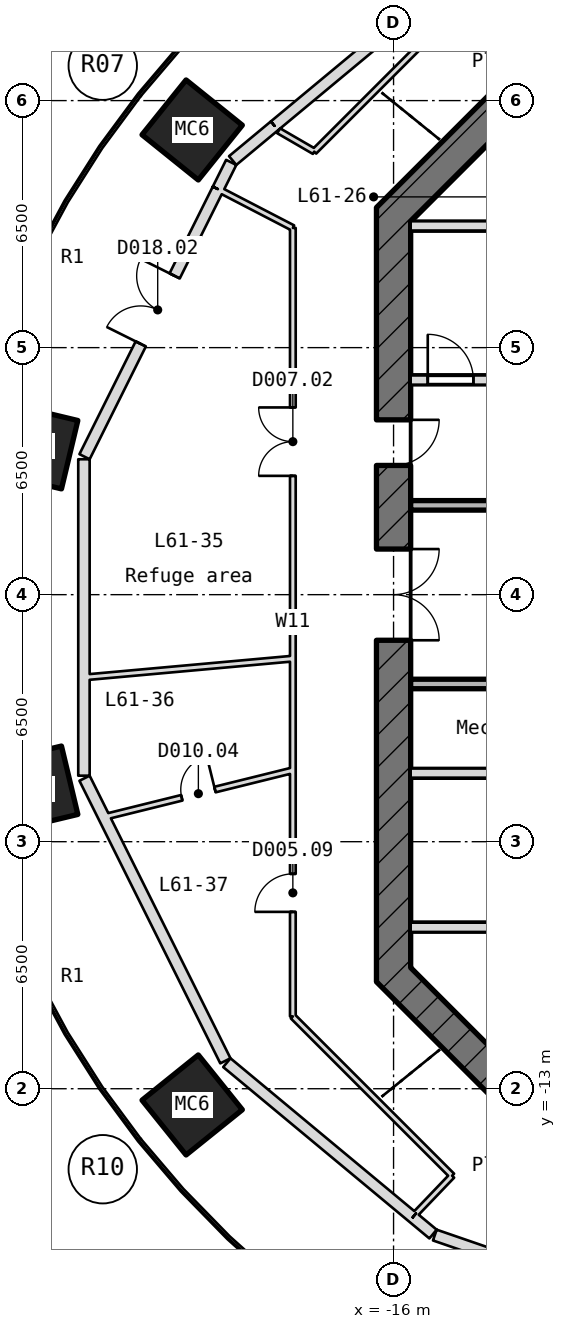
"""IFC4 building model, lengths in metres.
Left out: names, types, materials, properties, quantities, classifications, styles, units other than length and angle.
Written with IfcOpenShell. Run it as: python <this file> out.ifc"""

import sys

from ifc_helpers import new_model, si_unit, direction, frame, frame_2d, origin, place, context, subcontext, project, spatial, polyline, rectangle, outline, extrude, element, fill, save


model = new_model("IFC4")
c1 = context("Model", 3, precision=1e-05, world=origin(), true_north=direction((0.0, 1.0)))
c2 = subcontext(c1, "Body", "Model", "MODEL_VIEW")
j1 = project(units=[si_unit("LENGTHUNIT", "METRE"), si_unit("PLANEANGLEUNIT", "RADIAN")], contexts=[c1])
p1 = place(None, origin())
s1 = spatial("IfcSite", under=j1, at=p1, CompositionType="ELEMENT")
p2 = place(p1, origin())
s2 = spatial("IfcBuilding", under=s1, at=p2, CompositionType="ELEMENT")
p3 = place(p2, frame((0.0, 0.0, 273.1)))
s3 = spatial("IfcBuildingStorey", under=s2, at=p3, CompositionType="ELEMENT", Elevation=273.1)
p4 = place(p3, frame((0.0, 0.0, -0.3)))
e1 = element("IfcColumn", 1, at=p4, inside=s3, PredefinedType="COLUMN", context=c2, shape_type="SweptSolid", body=[
    extrude(outline(polyline([(-21.138, 10.911), (-22.97, 12.208), (-24.451, 13.399), (-23.292, 14.84), (-21.46, 13.543), (-19.979, 12.353), (-21.138, 10.911)])), origin(), (0.0, 0.0, 1.0), 6.05),
])
p5 = place(p3, frame((0.0, 0.0, -0.3)))
e2 = element("IfcColumn", 2, at=p5, inside=s3, PredefinedType="COLUMN", context=c2, shape_type="SweptSolid", body=[
    extrude(outline(polyline([(-24.739, 2.783), (-26.586, 3.226), (-28.352, 4.655), (-27.921, 6.454), (-26.073, 6.011), (-24.308, 4.583), (-24.739, 2.783)])), origin(), (0.0, 0.0, 1.0), 6.05),
])
p6 = place(p3, frame((0.0, 0.0, -0.3)))
e3 = element("IfcColumn", 3, at=p6, inside=s3, PredefinedType="COLUMN", context=c2, shape_type="SweptSolid", body=[
    extrude(outline(polyline([(-26.156, -6.225), (-27.921, -4.654), (-28.352, -2.854), (-26.504, -2.412), (-24.739, -3.983), (-24.308, -5.783), (-26.156, -6.225)])), origin(), (0.0, 0.0, 1.0), 6.05),
])
p7 = place(p3, frame((0.0, 0.0, -0.3)))
e4 = element("IfcColumn", 4, at=p7, inside=s3, PredefinedType="COLUMN", context=c2, shape_type="SweptSolid", body=[
    extrude(outline(polyline([(-21.46, -14.743), (-23.292, -13.04), (-24.451, -11.599), (-22.97, -10.408), (-21.138, -12.111), (-19.979, -13.552), (-21.46, -14.743)])), origin(), (0.0, 0.0, 1.0), 6.05),
])
p8 = place(p3, frame((0.0, 0.0, -0.3)))
e5 = element("IfcColumn", 5, at=p8, inside=s3, PredefinedType="COLUMN", context=c2, shape_type="SweptSolid", body=[
    extrude(outline(polyline([(-13.287, -21.077), (-14.904, -20.178), (-16.858, -18.375), (-15.936, -16.714), (-14.318, -17.612), (-12.365, -19.416), (-13.287, -21.077)])), origin(), (0.0, 0.0, 1.0), 6.05),
])
p9 = place(p3, frame((-12.868, 13.132, -0.3), z_axis=(0.0, 0.0, 1.0), x_axis=(-0.707106781187, -0.707106781187, 0.0)))
e6 = element("IfcWall", 6, at=p9, inside=s3, PredefinedType="SHEAR", context=c2, shape_type="SweptSolid", body=[
    extrude(rectangle(XDim=4.615, YDim=0.9, at=frame_2d((2.308, 0.0))), origin(), (0.0, 0.0, 1.0), 6.05),
])
p10 = place(p3, frame((-16.0, 10.186, -0.3), z_axis=(0.0, 0.0, 1.0), x_axis=(0.0, -1.0, 0.0)))
e7 = element("IfcWall", 7, at=p10, inside=s3, PredefinedType="SHEAR", context=c2, shape_type="SweptSolid", body=[
    extrude(rectangle(XDim=20.373, YDim=0.9, at=frame_2d((10.186, 0.0))), origin(), (0.0, 0.0, 1.0), 6.05),
])
p11 = place(p10, frame((8.986, 0.0, 0.3)))
e8 = element("IfcOpeningElement", 8, at=p11, cuts=e7, PredefinedType="OPENING", context=c2, shape_type="SweptSolid", body=[
    extrude(rectangle(XDim=2.4, YDim=2.1, at=frame_2d((1.2, 1.05))), frame((0.0, 0.46, 0.0), z_axis=(0.0, -1.0, 0.0), x_axis=(1.0, 0.0, 0.0)), (0.0, 0.0, 1.0), 0.92),
])
p12 = place(p10, frame((5.586, 0.0, 0.3)))
e9 = element("IfcOpeningElement", 9, at=p12, cuts=e7, PredefinedType="OPENING", context=c2, shape_type="SweptSolid", body=[
    extrude(rectangle(XDim=1.2, YDim=2.1, at=frame_2d((0.6, 1.05))), frame((0.0, 0.46, 0.0), z_axis=(0.0, -1.0, 0.0), x_axis=(1.0, 0.0, 0.0)), (0.0, 0.0, 1.0), 0.92),
])
p13 = place(p3, frame((-16.132, -9.868, -0.3), z_axis=(0.0, 0.0, 1.0), x_axis=(0.707106781187, -0.707106781187, 0.0)))
e10 = element("IfcWall", 10, at=p13, inside=s3, PredefinedType="SHEAR", context=c2, shape_type="SweptSolid", body=[
    extrude(rectangle(XDim=4.615, YDim=0.9, at=frame_2d((2.308, 0.0))), origin(), (0.0, 0.0, 1.0), 6.05),
])
p14 = place(p3, frame((-15.55, -8.75, -0.3), z_axis=(0.0, 0.0, 1.0), x_axis=(1.0, 0.0, 0.0)))
e11 = element("IfcWall", 11, at=p14, inside=s3, PredefinedType="SHEAR", context=c2, shape_type="SweptSolid", body=[
    extrude(rectangle(XDim=7.0, YDim=0.25, at=frame_2d((3.5, 0.0))), origin(), (0.0, 0.0, 1.0), 6.05),
])
p15 = place(p14, frame((5.5, 0.0, 0.3)))
e12 = element("IfcOpeningElement", 12, at=p15, cuts=e11, PredefinedType="OPENING", context=c2, shape_type="SweptSolid", body=[
    extrude(rectangle(XDim=1.2, YDim=2.1, at=frame_2d((0.6, 1.05))), frame((0.0, 0.135, 0.0), z_axis=(0.0, -1.0, 0.0), x_axis=(1.0, 0.0, 0.0)), (0.0, 0.0, 1.0), 0.27),
])
p16 = place(p3, frame((-15.55, -4.7, -0.3), z_axis=(0.0, 0.0, 1.0), x_axis=(1.0, 0.0, 0.0)))
e13 = element("IfcWall", 13, at=p16, inside=s3, PredefinedType="SHEAR", context=c2, shape_type="SweptSolid", body=[
    extrude(rectangle(XDim=7.0, YDim=0.25, at=frame_2d((3.5, 0.0))), origin(), (0.0, 0.0, 1.0), 6.05),
])
for number, where, z_axis, x_axis in (
    (14, (-15.55, -2.35, 0.0), (0.0, 0.0, 1.0), (1.0, 0.0, 0.0)),
    (15, (-15.55, 2.35, 0.0), (0.0, 0.0, 1.0), (1.0, 0.0, 0.0)),
):
    element("IfcWall", number, at=place(p3, frame(where, z_axis=z_axis, x_axis=x_axis)), inside=s3, PredefinedType="STANDARD", context=c2, shape_type="SweptSolid", body=[
        extrude(rectangle(XDim=7.15, YDim=0.25, at=frame_2d((3.575, 0.0))), origin(), (0.0, 0.0, 1.0), 5.75),
    ])
p17 = place(p3, frame((-15.55, 5.65, -0.3), z_axis=(0.0, 0.0, 1.0), x_axis=(1.0, 0.0, 0.0)))
e16 = element("IfcWall", 16, at=p17, inside=s3, PredefinedType="SHEAR", context=c2, shape_type="SweptSolid", body=[
    extrude(rectangle(XDim=7.0, YDim=0.25, at=frame_2d((3.5, 0.0))), origin(), (0.0, 0.0, 1.0), 6.05),
])
p18 = place(p17, frame((0.45, 0.0, 0.3)))
e17 = element("IfcOpeningElement", 17, at=p18, cuts=e16, PredefinedType="OPENING", context=c2, shape_type="SweptSolid", body=[
    extrude(rectangle(XDim=1.2, YDim=2.1, at=frame_2d((0.6, 1.05))), frame((0.0, 0.135, 0.0), z_axis=(0.0, -1.0, 0.0), x_axis=(1.0, 0.0, 0.0)), (0.0, 0.0, 1.0), 0.27),
])
p19 = place(p3, frame((-15.55, 9.7, -0.3), z_axis=(0.0, 0.0, 1.0), x_axis=(1.0, 0.0, 0.0)))
e18 = element("IfcWall", 18, at=p19, inside=s3, PredefinedType="SHEAR", context=c2, shape_type="SweptSolid", body=[
    extrude(rectangle(XDim=7.0, YDim=0.25, at=frame_2d((3.5, 0.0))), origin(), (0.0, 0.0, 1.0), 6.05),
])
p20 = place(p3, frame((-19.133, 12.337, 0.0), z_axis=(0.0, 0.0, 1.0), x_axis=(0.769069827142, 0.639164768257, 0.0)))
e19 = element("IfcWall", 19, at=p20, inside=s3, PredefinedType="STANDARD", context=c2, shape_type="SweptSolid", body=[
    extrude(rectangle(XDim=7.965, YDim=0.3, at=frame_2d((3.982, 0.0))), origin(), (0.0, 0.0, 1.0), 5.75),
])
p21 = place(p3, frame((-24.131, 3.63, 0.0), z_axis=(0.0, 0.0, 1.0), x_axis=(0.446058739895, 0.895003687458, 0.0)))
e20 = element("IfcWall", 20, at=p21, inside=s3, PredefinedType="STANDARD", context=c2, shape_type="SweptSolid", body=[
    extrude(rectangle(XDim=7.867, YDim=0.3, at=frame_2d((3.933, 0.0))), origin(), (0.0, 0.0, 1.0), 5.75),
])
p22 = place(p21, frame((3.316, 0.0, 0.0)))
e21 = element("IfcOpeningElement", 21, at=p22, cuts=e20, PredefinedType="OPENING", context=c2, shape_type="SweptSolid", body=[
    extrude(rectangle(XDim=2.0, YDim=2.1, at=frame_2d((1.0, 1.05))), frame((0.0, 0.16, 0.0), z_axis=(0.0, -1.0, 0.0), x_axis=(1.0, 0.0, 0.0)), (0.0, 0.0, 1.0), 0.32),
])
p23 = place(p3, frame((-24.147, -4.763, 0.0), z_axis=(0.0, 0.0, 1.0), x_axis=(0.0, 1.0, 0.0)))
e22 = element("IfcWall", 22, at=p23, inside=s3, PredefinedType="STANDARD", context=c2, shape_type="SweptSolid", body=[
    extrude(rectangle(XDim=8.326, YDim=0.3, at=frame_2d((4.163, 0.0))), origin(), (0.0, 0.0, 1.0), 5.75),
])
p24 = place(p3, frame((-20.425, -12.266, 0.0), z_axis=(0.0, 0.0, 1.0), x_axis=(-0.44606134028, 0.895002391453, 0.0)))
e23 = element("IfcWall", 23, at=p24, inside=s3, PredefinedType="STANDARD", context=c2, shape_type="SweptSolid", body=[
    extrude(rectangle(XDim=8.308, YDim=0.3, at=frame_2d((4.154, 0.0))), origin(), (0.0, 0.0, 1.0), 5.75),
])
p25 = place(p3, frame((-15.493, -16.382, 0.0), z_axis=(0.0, 0.0, 1.0), x_axis=(-0.769038321176, 0.639202675653, 0.0)))
e24 = element("IfcWall", 24, at=p25, inside=s3, PredefinedType="STANDARD", context=c2, shape_type="SweptSolid", body=[
    extrude(rectangle(XDim=6.363, YDim=0.3, at=frame_2d((3.182, 0.0))), origin(), (0.0, 0.0, 1.0), 5.75),
])
p26 = place(p3, frame((-20.233, 11.422, 0.0), z_axis=(0.0, 0.0, 1.0), x_axis=(0.769115538699, 0.639109762193, 0.0)))
e25 = element("IfcWall", 25, at=p26, inside=s3, PredefinedType="STANDARD", context=c2, shape_type="SweptSolid", body=[
    extrude(rectangle(XDim=1.431, YDim=0.3, at=frame_2d((0.715, 0.0))), origin(), (0.0, 0.0, 1.0), 5.75),
])
p27 = place(p3, frame((-20.622, 10.671, 0.0), z_axis=(0.0, 0.0, 1.0), x_axis=(0.446218959337, 0.89492381817, 0.0)))
e26 = element("IfcWall", 26, at=p27, inside=s3, PredefinedType="STANDARD", context=c2, shape_type="SweptSolid", body=[
    extrude(rectangle(XDim=0.786, YDim=0.3, at=frame_2d((0.393, 0.0))), origin(), (0.0, 0.0, 1.0), 5.75),
])
p28 = place(p3, frame((-14.961, -16.824, 0.0), z_axis=(0.0, 0.0, 1.0), x_axis=(-0.769030292566, 0.639212334922, 0.0)))
e27 = element("IfcWall", 27, at=p28, inside=s3, PredefinedType="STANDARD", context=c2, shape_type="SweptSolid", body=[
    extrude(rectangle(XDim=0.692, YDim=0.3, at=frame_2d((0.346, 0.0))), origin(), (0.0, 0.0, 1.0), 5.75),
])
p29 = place(p3, frame((-11.326, -18.086, 0.0), z_axis=(0.0, 0.0, 1.0), x_axis=(-0.945523953298, 0.325552536067, 0.0)))
e28 = element("IfcWall", 28, at=p29, inside=s3, PredefinedType="STANDARD", context=c2, shape_type="SweptSolid", body=[
    extrude(rectangle(XDim=3.795, YDim=0.3, at=frame_2d((1.898, 0.0))), origin(), (0.0, 0.0, 1.0), 5.75),
])
p30 = place(p3, frame((-24.137, -2.177, 0.0), z_axis=(0.0, 0.0, 1.0), x_axis=(0.995957513346, 0.089825562115, 0.0)))
e29 = element("IfcWall", 29, at=p30, inside=s3, PredefinedType="PARTITIONING", context=c2, shape_type="SweptSolid", body=[
    extrude(rectangle(XDim=5.517, YDim=0.15, at=frame_2d((2.759, 0.0))), origin(), (0.0, 0.0, 1.0), 5.75),
])
p31 = place(p3, frame((-23.628, -5.854, 0.0), z_axis=(0.0, 0.0, 1.0), x_axis=(0.970654908587, 0.240476710797, 0.0)))
e30 = element("IfcWall", 30, at=p31, inside=s3, PredefinedType="PARTITIONING", context=c2, shape_type="SweptSolid", body=[
    extrude(rectangle(XDim=5.135, YDim=0.15, at=frame_2d((2.567, 0.0))), origin(), (0.0, 0.0, 1.0), 5.214),
])
p32 = place(p31, frame((2.118, 0.0, 0.0)))
e31 = element("IfcOpeningElement", 31, at=p32, cuts=e30, PredefinedType="OPENING", context=c2, shape_type="SweptSolid", body=[
    extrude(rectangle(XDim=0.9, YDim=2.1, at=frame_2d((0.45, 1.05))), frame((0.0, 0.085, 0.0), z_axis=(0.0, -1.0, 0.0), x_axis=(1.0, 0.0, 0.0)), (0.0, 0.0, 1.0), 0.17),
])
p33 = place(p3, frame((-18.089, 11.658, 0.0), z_axis=(0.0, 0.0, 1.0), x_axis=(0.707106781187, 0.707106781187, 0.0)))
e32 = element("IfcWall", 32, at=p33, inside=s3, PredefinedType="PARTITIONING", context=c2, shape_type="SweptSolid", body=[
    extrude(rectangle(XDim=5.645, YDim=0.15, at=frame_2d((2.823, 0.0))), origin(), (0.0, 0.0, 1.0), 5.75),
])
p34 = place(p3, frame((-15.41, -16.282, 0.0), z_axis=(0.0, 0.0, 1.0), x_axis=(0.691492665809, 0.722383480661, 0.0)))
e33 = element("IfcWall", 33, at=p34, inside=s3, PredefinedType="PARTITIONING", context=c2, shape_type="SweptSolid", body=[
    extrude(rectangle(XDim=1.375, YDim=0.15, at=frame_2d((0.688, 0.0))), origin(), (0.0, 0.0, 1.0), 5.75),
])
p35 = place(p3, frame((-18.65, -11.098, 0.0), z_axis=(0.0, 0.0, 1.0), x_axis=(0.0, 1.0, 0.0)))
e34 = element("IfcWall", 34, at=p35, inside=s3, PredefinedType="PARTITIONING", context=c2, shape_type="SweptSolid", body=[
    extrude(rectangle(XDim=20.748, YDim=0.15, at=frame_2d((10.374, 0.0))), origin(), (0.0, 0.0, 1.0), 5.75),
])
p36 = place(p35, frame((14.224, 0.0, 0.0)))
e35 = element("IfcOpeningElement", 35, at=p36, cuts=e34, PredefinedType="OPENING", context=c2, shape_type="SweptSolid", body=[
    extrude(rectangle(XDim=1.8, YDim=2.1, at=frame_2d((0.9, 1.05))), frame((0.0, 0.085, 0.0), z_axis=(0.0, -1.0, 0.0), x_axis=(1.0, 0.0, 0.0)), (0.0, 0.0, 1.0), 0.17),
])
p37 = place(p35, frame((2.751, 0.0, 0.0)))
e36 = element("IfcOpeningElement", 36, at=p37, cuts=e34, PredefinedType="OPENING", context=c2, shape_type="SweptSolid", body=[
    extrude(rectangle(XDim=1.0, YDim=2.1, at=frame_2d((0.5, 1.05))), frame((0.0, 0.085, 0.0), z_axis=(0.0, -1.0, 0.0), x_axis=(1.0, 0.0, 0.0)), (0.0, 0.0, 1.0), 0.17),
])
p38 = place(p3, frame((-14.459, -15.289, 0.0), z_axis=(0.0, 0.0, 1.0), x_axis=(-0.707086184144, 0.707127377629, 0.0)))
e37 = element("IfcWall", 37, at=p38, inside=s3, PredefinedType="PARTITIONING", context=c2, shape_type="SweptSolid", body=[
    extrude(rectangle(XDim=5.927, YDim=0.15, at=frame_2d((2.963, 0.0))), origin(), (0.0, 0.0, 1.0), 5.75),
])
p39 = place(p3, frame((-18.086, 11.662, 0.0), z_axis=(0.0, 0.0, 1.0), x_axis=(-0.864984308723, 0.501798909587, 0.0)))
e38 = element("IfcWall", 38, at=p39, inside=s3, PredefinedType="PARTITIONING", context=c2, shape_type="SweptSolid", body=[
    extrude(rectangle(XDim=1.085, YDim=0.15, at=frame_2d((0.542, 0.0))), origin(), (0.0, 0.0, 1.0), 5.75),
])
p40 = place(p3, frame((-18.65, 9.65, 0.0), z_axis=(0.0, 0.0, 1.0), x_axis=(-0.887711908644, 0.460399356267, 0.0)))
e39 = element("IfcWall", 39, at=p40, inside=s3, PredefinedType="PARTITIONING", context=c2, shape_type="SweptSolid", body=[
    extrude(rectangle(XDim=2.081, YDim=0.15, at=frame_2d((1.041, 0.0))), origin(), (0.0, 0.0, 1.0), 5.75),
])
p41 = place(p18, origin())
e40 = element("IfcDoor", 40, at=p41, inside=s3, OperationType="SINGLE_SWING_RIGHT", PredefinedType="DOOR", context=c2, shape_type="SweptSolid", body=[
    extrude(rectangle(XDim=1.2, YDim=2.1, at=frame_2d((0.6, 1.05))), frame((0.0, 0.025, 0.0), z_axis=(0.0, -1.0, 0.0), x_axis=(1.0, 0.0, 0.0)), (0.0, 0.0, 1.0), 0.05),
])
fill(e17, e40)
p42 = place(p11, origin())
e41 = element("IfcDoor", 41, at=p42, inside=s3, OperationType="DOUBLE_DOOR_SINGLE_SWING", PredefinedType="DOOR", context=c2, shape_type="SweptSolid", body=[
    extrude(rectangle(XDim=2.4, YDim=2.1, at=frame_2d((1.2, 1.05))), frame((0.0, 0.025, 0.0), z_axis=(0.0, -1.0, 0.0), x_axis=(1.0, 0.0, 0.0)), (0.0, 0.0, 1.0), 0.05),
])
fill(e8, e41)
p43 = place(p12, origin())
e42 = element("IfcDoor", 42, at=p43, inside=s3, OperationType="SINGLE_SWING_RIGHT", PredefinedType="DOOR", context=c2, shape_type="SweptSolid", body=[
    extrude(rectangle(XDim=1.2, YDim=2.1, at=frame_2d((0.6, 1.05))), frame((0.0, 0.025, 0.0), z_axis=(0.0, -1.0, 0.0), x_axis=(1.0, 0.0, 0.0)), (0.0, 0.0, 1.0), 0.05),
])
fill(e9, e42)
p44 = place(p36, origin())
e43 = element("IfcDoor", 43, at=p44, inside=s3, OperationType="DOUBLE_DOOR_SINGLE_SWING", PredefinedType="DOOR", context=c2, shape_type="SweptSolid", body=[
    extrude(rectangle(XDim=1.8, YDim=2.1, at=frame_2d((0.9, 1.05))), frame((0.0, 0.025, 0.0), z_axis=(0.0, -1.0, 0.0), x_axis=(1.0, 0.0, 0.0)), (0.0, 0.0, 1.0), 0.05),
])
fill(e35, e43)
p45 = place(p22, origin())
e44 = element("IfcDoor", 44, at=p45, inside=s3, OperationType="DOUBLE_DOOR_SINGLE_SWING", PredefinedType="DOOR", context=c2, shape_type="SweptSolid", body=[
    extrude(rectangle(XDim=2.0, YDim=2.1, at=frame_2d((1.0, 1.05))), frame((0.0, 0.025, 0.0), z_axis=(0.0, -1.0, 0.0), x_axis=(1.0, 0.0, 0.0)), (0.0, 0.0, 1.0), 0.05),
])
fill(e21, e44)
p46 = place(p32, origin())
e45 = element("IfcDoor", 45, at=p46, inside=s3, OperationType="SINGLE_SWING_RIGHT", PredefinedType="DOOR", context=c2, shape_type="SweptSolid", body=[
    extrude(rectangle(XDim=0.9, YDim=2.1, at=frame_2d((0.45, 1.05))), frame((0.0, 0.025, 0.0), z_axis=(0.0, -1.0, 0.0), x_axis=(1.0, 0.0, 0.0)), (0.0, 0.0, 1.0), 0.05),
])
fill(e31, e45)
p47 = place(p37, origin())
e46 = element("IfcDoor", 46, at=p47, inside=s3, OperationType="SINGLE_SWING_RIGHT", PredefinedType="DOOR", context=c2, shape_type="SweptSolid", body=[
    extrude(rectangle(XDim=1.0, YDim=2.1, at=frame_2d((0.5, 1.05))), frame((0.0, 0.025, 0.0), z_axis=(0.0, -1.0, 0.0), x_axis=(1.0, 0.0, 0.0)), (0.0, 0.0, 1.0), 0.05),
])
fill(e36, e46)
save(model, sys.argv[1])
